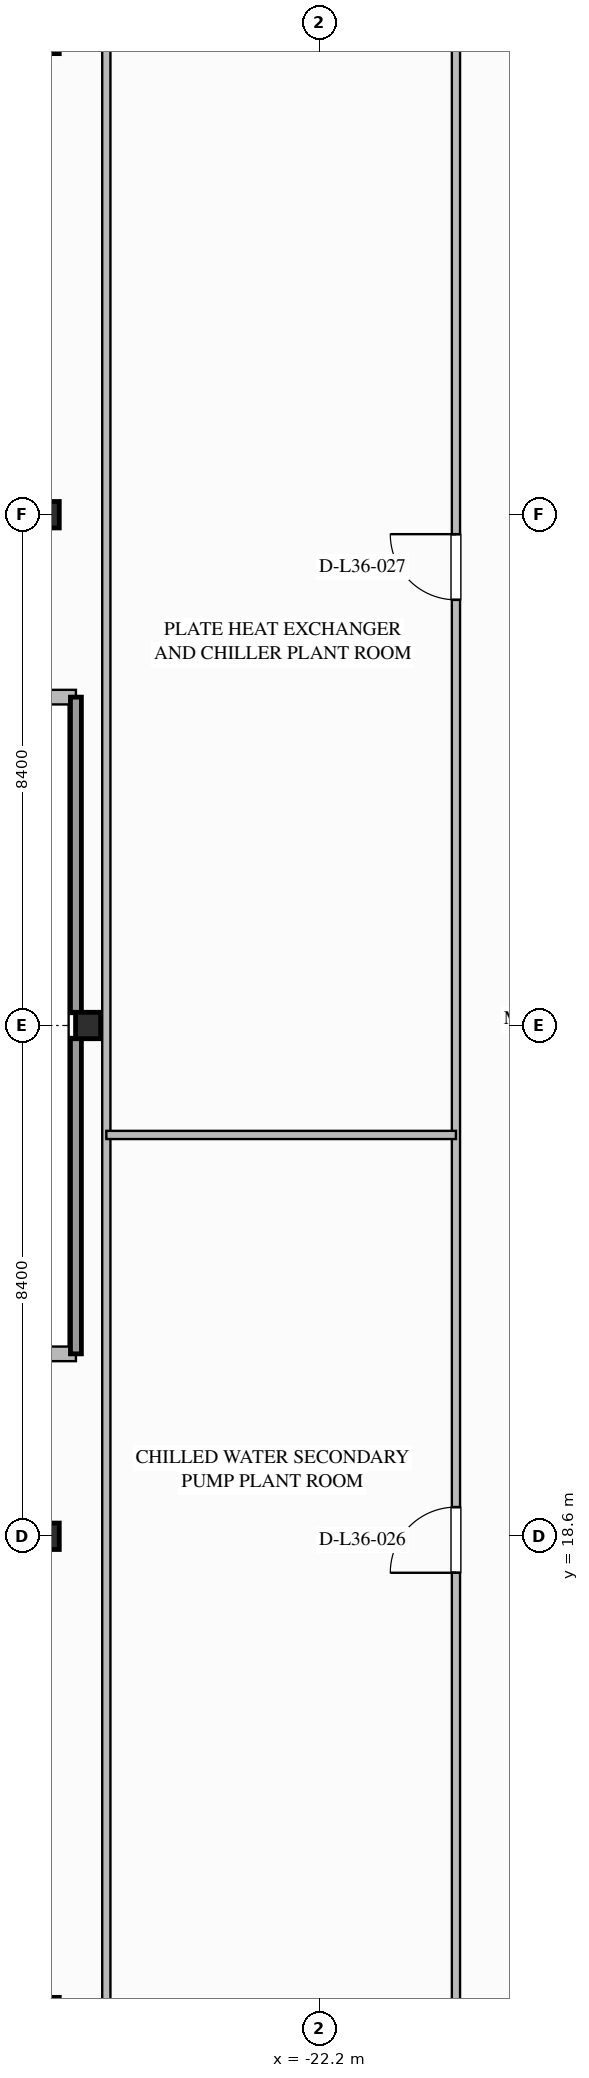
"""IFC4 building model, lengths in metres.
Left out: names, types, materials, properties, quantities, classifications, styles, units other than length and angle.
Written with IfcOpenShell. Run it as: python <this file> out.ifc"""

import sys

from ifc_helpers import new_model, si_unit, direction, frame, frame_2d, origin, origin_2d, place, context, subcontext, project, spatial, rectangle, i_section, extrude, element, fill, save


model = new_model("IFC4")
c1 = context("Model", 3, precision=1e-05, world=origin(), true_north=direction((0.0, 1.0)))
c2 = subcontext(c1, "Body", "Model", "MODEL_VIEW")
j1 = project(units=[si_unit("LENGTHUNIT", "METRE"), si_unit("PLANEANGLEUNIT", "RADIAN")], contexts=[c1])
p1 = place(None, origin())
s1 = spatial("IfcSite", under=j1, at=p1, CompositionType="ELEMENT")
p2 = place(p1, origin())
s2 = spatial("IfcBuilding", under=s1, at=p2, CompositionType="ELEMENT")
p3 = place(p2, frame((0.0, 0.0, 140.8)))
s3 = spatial("IfcBuildingStorey", under=s2, at=p3, CompositionType="ELEMENT", Elevation=140.8)
for number, where, z_axis, x_axis in (
    (1, (-26.68, 10.8, 0.0), (0.0, 0.0, 1.0), (1.0, 0.0, 0.0)),
    (2, (-26.68, 18.6, 0.0), (0.0, 0.0, 1.0), (1.0, 0.0, 0.0)),
    (3, (-26.0, 27.0, 0.0), (0.0, 0.0, 1.0), (1.0, 0.0, 0.0)),
    (4, (-26.68, 35.4, 0.0), (0.0, 0.0, 1.0), (1.0, 0.0, 0.0)),
    (5, (-26.68, 43.2, 0.0), (0.0, 0.0, 1.0), (1.0, 0.0, 0.0)),
):
    element("IfcColumn", number, at=place(p3, frame(where, z_axis=z_axis, x_axis=x_axis)), inside=s3, PredefinedType="COLUMN", context=c2, shape_type="SweptSolid", body=[
        extrude(i_section(OverallWidth=0.412, OverallDepth=0.435, WebThickness=0.036, FlangeThickness=0.057, FilletRadius=0.028, at=origin_2d()), origin(), (0.0, 0.0, 1.0), 4.997),
    ])
for number, where, z_axis, x_axis in (
    (6, (-26.88, 21.6, 0.0), (0.0, 0.0, 1.0), (1.0, 0.0, 0.0)),
    (7, (-26.2, 32.4, 0.0), (0.0, 0.0, 1.0), (-1.0, 0.0, 0.0)),
):
    element("IfcWall", number, at=place(p3, frame(where, z_axis=z_axis, x_axis=x_axis)), inside=s3, PredefinedType="STANDARD", context=c2, shape_type="SweptSolid", body=[
        extrude(rectangle(XDim=0.68, YDim=0.24, at=frame_2d((0.34, 0.0))), origin(), (0.0, 0.0, 1.0), 4.7),
    ])
p4 = place(p3, frame((-25.7, 6.6, 0.0), z_axis=(0.0, 0.0, 1.0), x_axis=(0.0, 1.0, 0.0)))
e8 = element("IfcWall", 8, at=p4, inside=s3, PredefinedType="PARTITIONING", context=c2, shape_type="SweptSolid", body=[
    extrude(rectangle(XDim=40.6, YDim=0.135, at=frame_2d((20.3, 0.0))), origin(), (0.0, 0.0, 1.0), 4.074),
])
p5 = place(p3, frame((-19.95, 6.8, 0.0), z_axis=(0.0, 0.0, 1.0), x_axis=(0.0, 1.0, 0.0)))
e9 = element("IfcWall", 9, at=p5, inside=s3, PredefinedType="PARTITIONING", context=c2, shape_type="SweptSolid", body=[
    extrude(rectangle(XDim=40.2, YDim=0.135, at=frame_2d((20.1, 0.0))), origin(), (0.0, 0.0, 1.0), 4.7),
])
p6 = place(p5, frame((11.2, 0.0, 0.0)))
e10 = element("IfcOpeningElement", 10, at=p6, cuts=e9, PredefinedType="OPENING", context=c2, shape_type="SweptSolid", body=[
    extrude(rectangle(XDim=1.08, YDim=2.04, at=frame_2d((0.54, 1.02))), frame((0.0, 0.077, 0.0), z_axis=(0.0, -1.0, 0.0), x_axis=(1.0, 0.0, 0.0)), (0.0, 0.0, 1.0), 0.155),
])
p7 = place(p5, frame((27.2, 0.0, 0.0)))
e11 = element("IfcOpeningElement", 11, at=p7, cuts=e9, PredefinedType="OPENING", context=c2, shape_type="SweptSolid", body=[
    extrude(rectangle(XDim=1.08, YDim=2.04, at=frame_2d((0.54, 1.02))), frame((0.0, 0.077, 0.0), z_axis=(0.0, -1.0, 0.0), x_axis=(1.0, 0.0, 0.0)), (0.0, 0.0, 1.0), 0.155),
])
p8 = place(p3, frame((-25.7, 25.2, 0.0), z_axis=(0.0, 0.0, 1.0), x_axis=(1.0, 0.0, 0.0)))
e12 = element("IfcWall", 12, at=p8, inside=s3, PredefinedType="PARTITIONING", context=c2, shape_type="SweptSolid", body=[
    extrude(rectangle(XDim=5.75, YDim=0.135, at=frame_2d((2.875, 0.0))), origin(), (0.0, 0.0, 1.0), 4.7),
])
p9 = place(p6, origin())
e13 = element("IfcDoor", 13, at=p9, inside=s3, OperationType="SINGLE_SWING_LEFT", PredefinedType="DOOR", context=c2, shape_type="SweptSolid", body=[
    extrude(rectangle(XDim=1.08, YDim=2.04, at=frame_2d((0.54, 1.02))), frame((0.0, 0.025, 0.0), z_axis=(0.0, -1.0, 0.0), x_axis=(1.0, 0.0, 0.0)), (0.0, 0.0, 1.0), 0.05),
])
fill(e10, e13)
p10 = place(p7, origin())
e14 = element("IfcDoor", 14, at=p10, inside=s3, OperationType="SINGLE_SWING_RIGHT", PredefinedType="DOOR", context=c2, shape_type="SweptSolid", body=[
    extrude(rectangle(XDim=1.08, YDim=2.04, at=frame_2d((0.54, 1.02))), frame((0.0, 0.025, 0.0), z_axis=(0.0, -1.0, 0.0), x_axis=(1.0, 0.0, 0.0)), (0.0, 0.0, 1.0), 0.05),
])
fill(e11, e14)
save(model, sys.argv[1])
